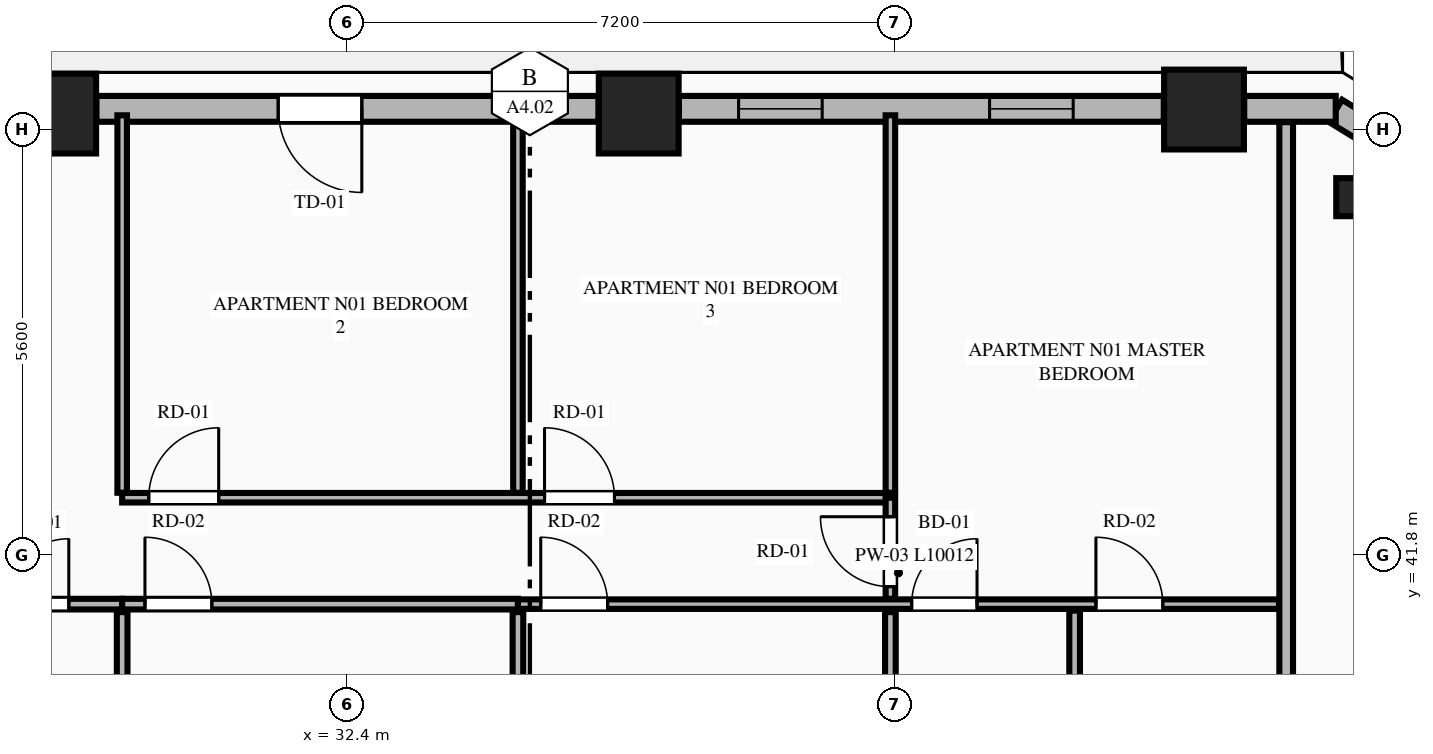
"""IFC4 building model, lengths in metres.
Left out: names, types, materials, properties, quantities, classifications, styles, units other than length and angle.
Written with IfcOpenShell. Run it as: python <this file> out.ifc"""

import sys

from ifc_helpers import new_model, si_unit, direction, frame, frame_2d, origin, origin_2d, place, context, subcontext, project, spatial, rectangle, extrude, element, fill, save


model = new_model("IFC4")
c1 = context("Model", 3, precision=1e-05, world=origin(), true_north=direction((0.0, 1.0)))
c2 = subcontext(c1, "Body", "Model", "MODEL_VIEW")
j1 = project(units=[si_unit("LENGTHUNIT", "METRE"), si_unit("PLANEANGLEUNIT", "RADIAN")], contexts=[c1])
p1 = place(None, origin())
s1 = spatial("IfcSite", under=j1, at=p1, CompositionType="ELEMENT")
p2 = place(p1, origin())
s2 = spatial("IfcBuilding", under=s1, at=p2, CompositionType="ELEMENT")
p3 = place(p2, frame((0.0, 0.0, 130.35)))
s3 = spatial("IfcBuildingStorey", under=s2, at=p3, CompositionType="ELEMENT", Elevation=130.35)
for number, where, z_axis, x_axis in (
    (1, (43.669, 47.661, 0.0), (0.0, 0.0, 1.0), (1.0, 0.0, 0.0)),
    (2, (36.232, 47.608, 0.0), (0.0, 0.0, 1.0), (1.0, 0.0, 0.0)),
    (3, (28.568, 47.608, 0.0), (0.0, 0.0, 1.0), (1.0, 0.0, 0.0)),
):
    element("IfcColumn", number, at=place(p3, frame(where, z_axis=z_axis, x_axis=x_axis)), inside=s3, PredefinedType="COLUMN", context=c2, shape_type="SweptSolid", body=[
        extrude(rectangle(XDim=1.05, YDim=1.05, at=origin_2d()), origin(), (0.0, 0.0, 1.0), 3.55),
    ])
p4 = place(p3, frame((45.659, 46.508, 0.0), z_axis=(0.0, 0.0, 1.0), x_axis=(-0.865160173452, 0.501495637342, 0.0)))
e4 = element("IfcColumn", 4, at=p4, inside=s3, PredefinedType="PILASTER", context=c2, shape_type="SweptSolid", body=[
    extrude(rectangle(XDim=0.5, YDim=0.35, at=origin_2d()), origin(), (0.0, 0.0, 1.0), 3.55),
])
p5 = place(p3, frame((46.971, 46.677, 0.0), z_axis=(0.0, 0.0, 1.0), x_axis=(-0.851798915137, 0.523868884523, 0.0)))
e5 = element("IfcWall", 5, at=p5, inside=s3, PredefinedType="STANDARD", context=c2, shape_type="SweptSolid", body=[
    extrude(rectangle(XDim=1.848, YDim=0.34, at=frame_2d((0.924, 0.0))), origin(), (0.0, 0.0, 1.0), 3.34),
])
p6 = place(p3, frame((45.402, 47.67, 0.0), z_axis=(0.0, 0.0, 1.0), x_axis=(-1.0, 0.0, 0.0)))
e6 = element("IfcWall", 6, at=p6, inside=s3, PredefinedType="STANDARD", context=c2, shape_type="SweptSolid", body=[
    extrude(rectangle(XDim=1.204, YDim=0.34, at=frame_2d((0.602, 0.0))), origin(), (0.0, 0.0, 1.0), 3.34),
])
p7 = place(p3, frame((43.14, 47.67, 0.0), z_axis=(0.0, 0.0, 1.0), x_axis=(-1.0, 0.0, 0.0)))
e7 = element("IfcWall", 7, at=p7, inside=s3, PredefinedType="STANDARD", context=c2, shape_type="SweptSolid", body=[
    extrude(rectangle(XDim=6.379, YDim=0.34, at=frame_2d((3.189, 0.0))), origin(), (0.0, 0.0, 1.0), 2.797),
])
p8 = place(p7, frame((1.192, 0.0, 0.75)))
e8 = element("IfcOpeningElement", 8, at=p8, cuts=e7, PredefinedType="OPENING", context=c2, shape_type="SweptSolid", body=[
    extrude(rectangle(XDim=1.1, YDim=1.897, at=frame_2d((0.55, 0.948))), frame((0.0, 0.18, 0.0), z_axis=(0.0, -1.0, 0.0), x_axis=(1.0, 0.0, 0.0)), (0.0, 0.0, 1.0), 0.36),
])
p9 = place(p7, frame((4.494, 0.0, 0.75)))
e9 = element("IfcOpeningElement", 9, at=p9, cuts=e7, PredefinedType="OPENING", context=c2, shape_type="SweptSolid", body=[
    extrude(rectangle(XDim=1.1, YDim=1.897, at=frame_2d((0.55, 0.948))), frame((0.0, 0.18, 0.0), z_axis=(0.0, -1.0, 0.0), x_axis=(1.0, 0.0, 0.0)), (0.0, 0.0, 1.0), 0.36),
])
p10 = place(p3, frame((35.703, 47.67, 0.0), z_axis=(0.0, 0.0, 1.0), x_axis=(-1.0, 0.0, 0.0)))
e10 = element("IfcWall", 10, at=p10, inside=s3, PredefinedType="STANDARD", context=c2, shape_type="SweptSolid", body=[
    extrude(rectangle(XDim=6.606, YDim=0.34, at=frame_2d((3.303, 0.0))), origin(), (0.0, 0.0, 1.0), 2.797),
])
p11 = place(p10, frame((3.114, 0.0, 0.0)))
e11 = element("IfcOpeningElement", 11, at=p11, cuts=e10, PredefinedType="OPENING", context=c2, shape_type="SweptSolid", body=[
    extrude(rectangle(XDim=1.1, YDim=2.25, at=frame_2d((0.55, 1.125))), frame((0.0, 0.18, 0.0), z_axis=(0.0, -1.0, 0.0), x_axis=(1.0, 0.0, 0.0)), (0.0, 0.0, 1.0), 0.36),
])
p12 = place(p3, frame((44.75, 35.3, 0.0), z_axis=(0.0, 0.0, 1.0), x_axis=(0.0, 1.0, 0.0)))
e12 = element("IfcWall", 12, at=p12, inside=s3, PredefinedType="PARTITIONING", context=c2, shape_type="SweptSolid", body=[
    extrude(rectangle(XDim=12.195, YDim=0.18, at=frame_2d((6.098, 0.0))), origin(), (0.0, 0.0, 1.0), 3.34),
])
p13 = place(p3, frame((22.1, 41.154, 0.0), z_axis=(0.0, 0.0, 1.0), x_axis=(1.0, 0.0, 0.0)))
e13 = element("IfcWall", 13, at=p13, inside=s3, PredefinedType="PLUMBINGWALL", context=c2, shape_type="SweptSolid", body=[
    extrude(rectangle(XDim=7.336, YDim=0.14, at=frame_2d((3.668, 0.0))), origin(), (0.0, 0.0, 1.0), 3.34),
])
p14 = place(p13, frame((5.774, 0.0, 0.0)))
e14 = element("IfcOpeningElement", 14, at=p14, cuts=e13, PredefinedType="OPENING", context=c2, shape_type="SweptSolid", body=[
    extrude(rectangle(XDim=0.86, YDim=2.1, at=frame_2d((0.43, 1.05))), frame((0.0, 0.08, 0.0), z_axis=(0.0, -1.0, 0.0), x_axis=(1.0, 0.0, 0.0)), (0.0, 0.0, 1.0), 0.16),
])
p15 = place(p13, frame((0.26, 0.0, 0.0)))
e15 = element("IfcOpeningElement", 15, at=p15, cuts=e13, PredefinedType="OPENING", context=c2, shape_type="SweptSolid", body=[
    extrude(rectangle(XDim=0.88, YDim=2.15, at=frame_2d((0.44, 1.075))), frame((0.0, 0.08, 0.0), z_axis=(0.0, -1.0, 0.0), x_axis=(1.0, 0.0, 0.0)), (0.0, 0.0, 1.0), 0.16),
])
p16 = place(p13, frame((3.485, 0.0, 0.0)))
e16 = element("IfcOpeningElement", 16, at=p16, cuts=e13, PredefinedType="OPENING", context=c2, shape_type="SweptSolid", body=[
    extrude(rectangle(XDim=0.88, YDim=2.15, at=frame_2d((0.44, 1.075))), frame((0.0, 0.08, 0.0), z_axis=(0.0, -1.0, 0.0), x_axis=(1.0, 0.0, 0.0)), (0.0, 0.0, 1.0), 0.16),
])
p17 = place(p3, frame((29.436, 41.154, 0.0), z_axis=(0.0, 0.0, 1.0), x_axis=(1.0, 0.0, 0.0)))
e17 = element("IfcWall", 17, at=p17, inside=s3, PredefinedType="PLUMBINGWALL", context=c2, shape_type="SweptSolid", body=[
    extrude(rectangle(XDim=5.207, YDim=0.14, at=frame_2d((2.604, 0.0))), origin(), (0.0, 0.0, 1.0), 3.34),
])
p18 = place(p17, frame((0.3, 0.0, 0.0)))
e18 = element("IfcOpeningElement", 18, at=p18, cuts=e17, PredefinedType="OPENING", context=c2, shape_type="SweptSolid", body=[
    extrude(rectangle(XDim=0.88, YDim=2.15, at=frame_2d((0.44, 1.075))), frame((0.0, 0.08, 0.0), z_axis=(0.0, -1.0, 0.0), x_axis=(1.0, 0.0, 0.0)), (0.0, 0.0, 1.0), 0.16),
])
p19 = place(p3, frame((34.643, 41.154, 0.0), z_axis=(0.0, 0.0, 1.0), x_axis=(1.0, 0.0, 0.0)))
e19 = element("IfcWall", 19, at=p19, inside=s3, PredefinedType="PARTITIONING", context=c2, shape_type="SweptSolid", body=[
    extrude(rectangle(XDim=10.012, YDim=0.125, at=frame_2d((5.006, 0.0))), origin(), (0.0, 0.0, 1.0), 3.34),
])
p20 = place(p19, frame((5.18, 0.0, 0.0)))
e20 = element("IfcOpeningElement", 20, at=p20, cuts=e19, PredefinedType="OPENING", context=c2, shape_type="SweptSolid", body=[
    extrude(rectangle(XDim=0.86, YDim=2.1, at=frame_2d((0.43, 1.05))), frame((0.0, 0.073, 0.0), z_axis=(0.0, -1.0, 0.0), x_axis=(1.0, 0.0, 0.0)), (0.0, 0.0, 1.0), 0.145),
])
p21 = place(p19, frame((7.604, 0.0, 0.0)))
e21 = element("IfcOpeningElement", 21, at=p21, cuts=e19, PredefinedType="OPENING", context=c2, shape_type="SweptSolid", body=[
    extrude(rectangle(XDim=0.88, YDim=2.15, at=frame_2d((0.44, 1.075))), frame((0.0, 0.073, 0.0), z_axis=(0.0, -1.0, 0.0), x_axis=(1.0, 0.0, 0.0)), (0.0, 0.0, 1.0), 0.145),
])
p22 = place(p19, frame((0.3, 0.0, 0.0)))
e22 = element("IfcOpeningElement", 22, at=p22, cuts=e19, PredefinedType="OPENING", context=c2, shape_type="SweptSolid", body=[
    extrude(rectangle(XDim=0.88, YDim=2.15, at=frame_2d((0.44, 1.075))), frame((0.0, 0.073, 0.0), z_axis=(0.0, -1.0, 0.0), x_axis=(1.0, 0.0, 0.0)), (0.0, 0.0, 1.0), 0.145),
])
p23 = place(p3, frame((29.436, 42.619, 0.0), z_axis=(0.0, 0.0, 1.0), x_axis=(0.0, 1.0, 0.0)))
e23 = element("IfcWall", 23, at=p23, inside=s3, PredefinedType="PARTITIONING", context=c2, shape_type="SweptSolid", body=[
    extrude(rectangle(XDim=4.966, YDim=0.125, at=frame_2d((2.483, 0.0))), origin(), (0.0, 0.0, 1.0), 3.34),
])
p24 = place(p3, frame((29.436, 42.554, 0.0), z_axis=(0.0, 0.0, 1.0), x_axis=(1.0, 0.0, 0.0)))
e24 = element("IfcWall", 24, at=p24, inside=s3, PredefinedType="PARTITIONING", context=c2, shape_type="SweptSolid", body=[
    extrude(rectangle(XDim=10.107, YDim=0.125, at=frame_2d((5.053, 0.0))), origin(), (0.0, 0.0, 1.0), 2.975),
])
p25 = place(p24, frame((0.35, 0.0, 0.0)))
e25 = element("IfcOpeningElement", 25, at=p25, cuts=e24, PredefinedType="OPENING", context=c2, shape_type="SweptSolid", body=[
    extrude(rectangle(XDim=0.92, YDim=2.15, at=frame_2d((0.46, 1.075))), frame((0.0, 0.073, 0.0), z_axis=(0.0, -1.0, 0.0), x_axis=(1.0, 0.0, 0.0)), (0.0, 0.0, 1.0), 0.145),
])
p26 = place(p24, frame((5.557, 0.0, 0.0)))
e26 = element("IfcOpeningElement", 26, at=p26, cuts=e24, PredefinedType="OPENING", context=c2, shape_type="SweptSolid", body=[
    extrude(rectangle(XDim=0.92, YDim=2.15, at=frame_2d((0.46, 1.075))), frame((0.0, 0.073, 0.0), z_axis=(0.0, -1.0, 0.0), x_axis=(1.0, 0.0, 0.0)), (0.0, 0.0, 1.0), 0.145),
])
p27 = place(p3, frame((39.543, 41.224, 0.0), z_axis=(0.0, 0.0, 1.0), x_axis=(0.0, 1.0, 0.0)))
e27 = element("IfcWall", 27, at=p27, inside=s3, PredefinedType="PARTITIONING", context=c2, shape_type="SweptSolid", body=[
    extrude(rectangle(XDim=1.33, YDim=0.125, at=frame_2d((0.665, 0.0))), origin(), (0.0, 0.0, 1.0), 3.34),
])
p28 = place(p27, frame((0.16, 0.0, 0.0)))
e28 = element("IfcOpeningElement", 28, at=p28, cuts=e27, PredefinedType="OPENING", context=c2, shape_type="SweptSolid", body=[
    extrude(rectangle(XDim=0.92, YDim=2.15, at=frame_2d((0.46, 1.075))), frame((0.0, 0.073, 0.0), z_axis=(0.0, -1.0, 0.0), x_axis=(1.0, 0.0, 0.0)), (0.0, 0.0, 1.0), 0.145),
])
for number, where, z_axis, x_axis in (
    (29, (29.436, 35.385, 0.0), (0.0, 0.0, 1.0), (0.0, 1.0, 0.0)),
    (30, (34.643, 35.385, 0.0), (0.0, 0.0, 1.0), (0.0, 1.0, 0.0)),
):
    element("IfcWall", number, at=place(p3, frame(where, z_axis=z_axis, x_axis=x_axis)), inside=s3, PredefinedType="PLUMBINGWALL", context=c2, shape_type="SweptSolid", body=[
        extrude(rectangle(XDim=5.664, YDim=0.14, at=frame_2d((2.832, 0.0))), origin(), (0.0, 0.0, 1.0), 3.34),
    ])
for number, where, z_axis, x_axis in (
    (31, (34.643, 42.619, 0.0), (0.0, 0.0, 1.0), (0.0, 1.0, 0.0)),
    (32, (39.543, 42.619, 0.0), (0.0, 0.0, 1.0), (0.0, 1.0, 0.0)),
):
    element("IfcWall", number, at=place(p3, frame(where, z_axis=z_axis, x_axis=x_axis)), inside=s3, PredefinedType="PARTITIONING", context=c2, shape_type="SweptSolid", body=[
        extrude(rectangle(XDim=4.966, YDim=0.125, at=frame_2d((2.483, 0.0))), origin(), (0.0, 0.0, 1.0), 3.34),
    ])
p29 = place(p3, frame((39.543, 35.385, 0.0), z_axis=(0.0, 0.0, 1.0), x_axis=(0.0, 1.0, 0.0)))
e33 = element("IfcWall", 33, at=p29, inside=s3, PredefinedType="PLUMBINGWALL", context=c2, shape_type="SweptSolid", body=[
    extrude(rectangle(XDim=5.664, YDim=0.14, at=frame_2d((2.832, 0.0))), origin(), (0.0, 0.0, 1.0), 3.34),
])
p30 = place(p3, frame((41.967, 35.385, 0.0), z_axis=(0.0, 0.0, 1.0), x_axis=(0.0, 1.0, 0.0)))
e34 = element("IfcWall", 34, at=p30, inside=s3, PredefinedType="PLUMBINGWALL", context=c2, shape_type="SweptSolid", body=[
    extrude(rectangle(XDim=5.684, YDim=0.14, at=frame_2d((2.842, 0.0))), origin(), (0.0, 0.0, 1.0), 2.722),
])
p31 = place(p8, origin())
e35 = element("IfcWindow", 35, at=p31, inside=s3, PartitioningType="SINGLE_PANEL", PredefinedType="WINDOW", context=c2, shape_type="SweptSolid", body=[
    extrude(rectangle(XDim=1.1, YDim=1.897, at=frame_2d((0.55, 0.948))), frame((0.0, 0.03, 0.0), z_axis=(0.0, -1.0, 0.0), x_axis=(1.0, 0.0, 0.0)), (0.0, 0.0, 1.0), 0.06),
])
fill(e8, e35)
p32 = place(p11, origin())
e36 = element("IfcDoor", 36, at=p32, inside=s3, OperationType="SINGLE_SWING_LEFT", PredefinedType="DOOR", context=c2, shape_type="SweptSolid", body=[
    extrude(rectangle(XDim=1.1, YDim=2.25, at=frame_2d((0.55, 1.125))), frame((0.0, 0.025, 0.0), z_axis=(0.0, -1.0, 0.0), x_axis=(1.0, 0.0, 0.0)), (0.0, 0.0, 1.0), 0.05),
])
fill(e11, e36)
p33 = place(p14, origin())
e37 = element("IfcDoor", 37, at=p33, inside=s3, OperationType="SINGLE_SWING_RIGHT", PredefinedType="DOOR", context=c2, shape_type="SweptSolid", body=[
    extrude(rectangle(XDim=0.86, YDim=2.1, at=frame_2d((0.43, 1.05))), frame((0.0, 0.025, 0.0), z_axis=(0.0, -1.0, 0.0), x_axis=(1.0, 0.0, 0.0)), (0.0, 0.0, 1.0), 0.05),
])
fill(e14, e37)
p34 = place(p20, origin())
e38 = element("IfcDoor", 38, at=p34, inside=s3, OperationType="SINGLE_SWING_RIGHT", PredefinedType="DOOR", context=c2, shape_type="SweptSolid", body=[
    extrude(rectangle(XDim=0.86, YDim=2.1, at=frame_2d((0.43, 1.05))), frame((0.0, 0.025, 0.0), z_axis=(0.0, -1.0, 0.0), x_axis=(1.0, 0.0, 0.0)), (0.0, 0.0, 1.0), 0.05),
])
fill(e20, e38)
p35 = place(p21, origin())
e39 = element("IfcDoor", 39, at=p35, inside=s3, OperationType="SINGLE_SWING_LEFT", PredefinedType="DOOR", context=c2, shape_type="SweptSolid", body=[
    extrude(rectangle(XDim=0.88, YDim=2.15, at=frame_2d((0.44, 1.075))), frame((0.0, 0.025, 0.0), z_axis=(0.0, -1.0, 0.0), x_axis=(1.0, 0.0, 0.0)), (0.0, 0.0, 1.0), 0.05),
])
fill(e21, e39)
p36 = place(p18, origin())
e40 = element("IfcDoor", 40, at=p36, inside=s3, OperationType="SINGLE_SWING_LEFT", PredefinedType="DOOR", context=c2, shape_type="SweptSolid", body=[
    extrude(rectangle(XDim=0.88, YDim=2.15, at=frame_2d((0.44, 1.075))), frame((0.0, 0.025, 0.0), z_axis=(0.0, -1.0, 0.0), x_axis=(1.0, 0.0, 0.0)), (0.0, 0.0, 1.0), 0.05),
])
fill(e18, e40)
p37 = place(p25, origin())
e41 = element("IfcDoor", 41, at=p37, inside=s3, OperationType="SINGLE_SWING_RIGHT", PredefinedType="DOOR", context=c2, shape_type="SweptSolid", body=[
    extrude(rectangle(XDim=0.92, YDim=2.15, at=frame_2d((0.46, 1.075))), frame((0.0, 0.025, 0.0), z_axis=(0.0, -1.0, 0.0), x_axis=(1.0, 0.0, 0.0)), (0.0, 0.0, 1.0), 0.05),
])
fill(e25, e41)
p38 = place(p26, origin())
e42 = element("IfcDoor", 42, at=p38, inside=s3, OperationType="SINGLE_SWING_LEFT", PredefinedType="DOOR", context=c2, shape_type="SweptSolid", body=[
    extrude(rectangle(XDim=0.92, YDim=2.15, at=frame_2d((0.46, 1.075))), frame((0.0, 0.025, 0.0), z_axis=(0.0, -1.0, 0.0), x_axis=(1.0, 0.0, 0.0)), (0.0, 0.0, 1.0), 0.05),
])
fill(e26, e42)
p39 = place(p28, origin())
e43 = element("IfcDoor", 43, at=p39, inside=s3, OperationType="SINGLE_SWING_RIGHT", PredefinedType="DOOR", context=c2, shape_type="SweptSolid", body=[
    extrude(rectangle(XDim=0.92, YDim=2.15, at=frame_2d((0.46, 1.075))), frame((0.0, 0.025, 0.0), z_axis=(0.0, -1.0, 0.0), x_axis=(1.0, 0.0, 0.0)), (0.0, 0.0, 1.0), 0.05),
])
fill(e28, e43)
p40 = place(p22, origin())
e44 = element("IfcDoor", 44, at=p40, inside=s3, OperationType="SINGLE_SWING_LEFT", PredefinedType="DOOR", context=c2, shape_type="SweptSolid", body=[
    extrude(rectangle(XDim=0.88, YDim=2.15, at=frame_2d((0.44, 1.075))), frame((0.0, 0.025, 0.0), z_axis=(0.0, -1.0, 0.0), x_axis=(1.0, 0.0, 0.0)), (0.0, 0.0, 1.0), 0.05),
])
fill(e22, e44)
p41 = place(p9, origin())
e45 = element("IfcWindow", 45, at=p41, inside=s3, PartitioningType="SINGLE_PANEL", PredefinedType="WINDOW", context=c2, shape_type="SweptSolid", body=[
    extrude(rectangle(XDim=1.1, YDim=1.897, at=frame_2d((0.55, 0.948))), frame((0.0, 0.03, 0.0), z_axis=(0.0, -1.0, 0.0), x_axis=(1.0, 0.0, 0.0)), (0.0, 0.0, 1.0), 0.06),
])
fill(e9, e45)
save(model, sys.argv[1])
